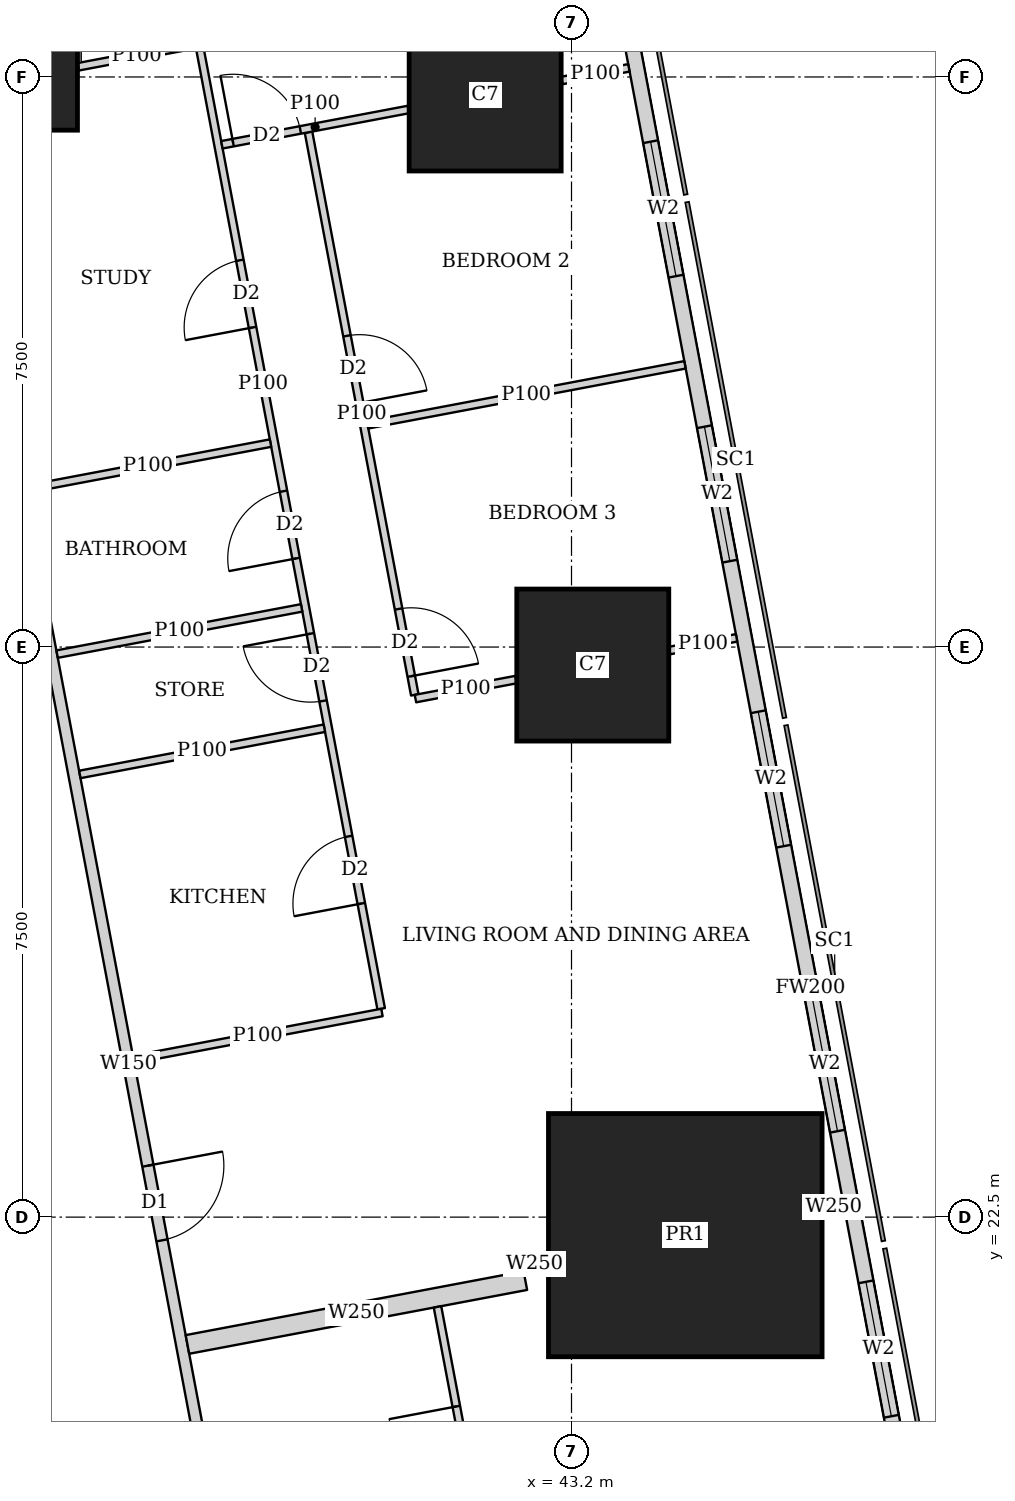
"""IFC4 building model, lengths in metres.
Left out: names, types, materials, properties, quantities, classifications, styles, units other than length and angle.
Written with IfcOpenShell. Run it as: python <this file> out.ifc"""

import sys

from ifc_helpers import new_model, si_unit, direction, frame, frame_2d, origin, origin_2d, place, context, subcontext, project, spatial, rectangle, extrude, element, fill, save


model = new_model("IFC4")
c1 = context("Model", 3, precision=1e-05, world=origin(), true_north=direction((0.0, 1.0)))
c2 = subcontext(c1, "Body", "Model", "MODEL_VIEW")
j1 = project(units=[si_unit("LENGTHUNIT", "METRE"), si_unit("PLANEANGLEUNIT", "RADIAN")], contexts=[c1])
p1 = place(None, origin())
s1 = spatial("IfcSite", under=j1, at=p1, CompositionType="ELEMENT")
p2 = place(p1, origin())
s2 = spatial("IfcBuilding", under=s1, at=p2, CompositionType="ELEMENT")
p3 = place(p2, frame((0.0, 0.0, 289.1)))
s3 = spatial("IfcBuildingStorey", under=s2, at=p3, CompositionType="ELEMENT", Elevation=289.1)
p4 = place(p3, frame((44.697, 22.263, 0.0), z_axis=(0.0, 0.0, 1.0), x_axis=(1.0, 0.0, 0.0)))
e1 = element("IfcColumn", 1, at=p4, inside=s3, PredefinedType="COLUMN", context=c2, shape_type="SweptSolid", body=[
    extrude(rectangle(XDim=3.6, YDim=3.2, at=origin_2d()), origin(), (0.0, 0.0, 1.0), 3.75),
])
p5 = place(p3, frame((43.48, 29.763, 0.0), z_axis=(0.0, 0.0, 1.0), x_axis=(1.0, 0.0, 0.0)))
e2 = element("IfcColumn", 2, at=p5, inside=s3, PredefinedType="COLUMN", context=c2, shape_type="SweptSolid", body=[
    extrude(rectangle(XDim=2.0, YDim=2.0, at=origin_2d()), origin(), (0.0, 0.0, 1.0), 3.75),
])
p6 = place(p3, frame((36.0, 37.5, 0.0), z_axis=(0.0, 0.0, 1.0), x_axis=(1.0, 0.0, 0.0)))
e3 = element("IfcColumn", 3, at=p6, inside=s3, PredefinedType="COLUMN", context=c2, shape_type="SweptSolid", body=[
    extrude(rectangle(XDim=1.4, YDim=1.4, at=origin_2d()), origin(), (0.0, 0.0, 1.0), 3.75),
])
p7 = place(p3, frame((42.064, 37.263, 0.0), z_axis=(0.0, 0.0, 1.0), x_axis=(1.0, 0.0, 0.0)))
e4 = element("IfcColumn", 4, at=p7, inside=s3, PredefinedType="COLUMN", context=c2, shape_type="SweptSolid", body=[
    extrude(rectangle(XDim=2.0, YDim=2.0, at=origin_2d()), origin(), (0.0, 0.0, 1.0), 3.75),
])
p8 = place(p3, frame((49.684, 7.832, 0.0), z_axis=(0.0, 0.0, 1.0), x_axis=(-0.185616669694, 0.982622232565, 0.0)))
e5 = element("IfcWall", 5, at=p8, inside=s3, PredefinedType="SOLIDWALL", context=c2, shape_type="SweptSolid", body=[
    extrude(rectangle(XDim=36.0, YDim=0.2, at=frame_2d((18.0, 0.0))), origin(), (0.0, 0.0, 1.0), 3.5),
])
p9 = place(p8, frame((2.518, 0.0, 0.9)))
e6 = element("IfcOpeningElement", 6, at=p9, cuts=e5, PredefinedType="OPENING", context=c2, shape_type="SweptSolid", body=[
    extrude(rectangle(XDim=2.4, YDim=1.5, at=frame_2d((1.2, 0.75))), frame((0.0, 0.11, 0.0), z_axis=(0.0, -1.0, 0.0), x_axis=(1.0, 0.0, 0.0)), (0.0, 0.0, 1.0), 0.22),
])
p10 = place(p8, frame((8.444, 0.0, 0.9)))
e7 = element("IfcOpeningElement", 7, at=p10, cuts=e5, PredefinedType="OPENING", context=c2, shape_type="SweptSolid", body=[
    extrude(rectangle(XDim=1.8, YDim=1.5, at=frame_2d((0.9, 0.75))), frame((0.0, 0.11, 0.0), z_axis=(0.0, -1.0, 0.0), x_axis=(1.0, 0.0, 0.0)), (0.0, 0.0, 1.0), 0.22),
])
p11 = place(p8, frame((12.261, 0.0, 0.9)))
e8 = element("IfcOpeningElement", 8, at=p11, cuts=e5, PredefinedType="OPENING", context=c2, shape_type="SweptSolid", body=[
    extrude(rectangle(XDim=1.8, YDim=1.5, at=frame_2d((0.9, 0.75))), frame((0.0, 0.11, 0.0), z_axis=(0.0, -1.0, 0.0), x_axis=(1.0, 0.0, 0.0)), (0.0, 0.0, 1.0), 0.22),
])
p12 = place(p8, frame((16.078, 0.0, 0.9)))
e9 = element("IfcOpeningElement", 9, at=p12, cuts=e5, PredefinedType="OPENING", context=c2, shape_type="SweptSolid", body=[
    extrude(rectangle(XDim=1.8, YDim=1.5, at=frame_2d((0.9, 0.75))), frame((0.0, 0.11, 0.0), z_axis=(0.0, -1.0, 0.0), x_axis=(1.0, 0.0, 0.0)), (0.0, 0.0, 1.0), 0.22),
])
p13 = place(p8, frame((19.894, 0.0, 0.9)))
e10 = element("IfcOpeningElement", 10, at=p13, cuts=e5, PredefinedType="OPENING", context=c2, shape_type="SweptSolid", body=[
    extrude(rectangle(XDim=1.8, YDim=1.5, at=frame_2d((0.9, 0.75))), frame((0.0, 0.11, 0.0), z_axis=(0.0, -1.0, 0.0), x_axis=(1.0, 0.0, 0.0)), (0.0, 0.0, 1.0), 0.22),
])
p14 = place(p8, frame((23.71, 0.0, 0.9)))
e11 = element("IfcOpeningElement", 11, at=p14, cuts=e5, PredefinedType="OPENING", context=c2, shape_type="SweptSolid", body=[
    extrude(rectangle(XDim=1.8, YDim=1.5, at=frame_2d((0.9, 0.75))), frame((0.0, 0.11, 0.0), z_axis=(0.0, -1.0, 0.0), x_axis=(1.0, 0.0, 0.0)), (0.0, 0.0, 1.0), 0.22),
])
p15 = place(p8, frame((27.526, 0.0, 0.9)))
e12 = element("IfcOpeningElement", 12, at=p15, cuts=e5, PredefinedType="OPENING", context=c2, shape_type="SweptSolid", body=[
    extrude(rectangle(XDim=1.8, YDim=1.5, at=frame_2d((0.9, 0.75))), frame((0.0, 0.11, 0.0), z_axis=(0.0, -1.0, 0.0), x_axis=(1.0, 0.0, 0.0)), (0.0, 0.0, 1.0), 0.22),
])
p16 = place(p8, frame((32.046, 0.0, 0.9)))
e13 = element("IfcOpeningElement", 13, at=p16, cuts=e5, PredefinedType="OPENING", context=c2, shape_type="SweptSolid", body=[
    extrude(rectangle(XDim=1.8, YDim=1.5, at=frame_2d((0.9, 0.75))), frame((0.0, 0.11, 0.0), z_axis=(0.0, -1.0, 0.0), x_axis=(1.0, 0.0, 0.0)), (0.0, 0.0, 1.0), 0.22),
])
p17 = place(p3, frame((34.036, 42.186, 0.0), z_axis=(0.0, 0.0, 1.0), x_axis=(0.185593518645, -0.9826266055, 0.0)))
e14 = element("IfcWall", 14, at=p17, inside=s3, PredefinedType="SOLIDWALL", context=c2, shape_type="SweptSolid", body=[
    extrude(rectangle(XDim=35.961, YDim=0.15, at=frame_2d((17.98, 0.0))), origin(), (0.0, 0.0, 1.0), 2.5),
])
p18 = place(p17, frame((19.345, 0.0, 0.0)))
e15 = element("IfcOpeningElement", 15, at=p18, cuts=e14, PredefinedType="OPENING", context=c2, shape_type="SweptSolid", body=[
    extrude(rectangle(XDim=1.0, YDim=2.1, at=frame_2d((0.5, 1.05))), frame((0.0, 0.085, 0.0), z_axis=(0.0, -1.0, 0.0), x_axis=(1.0, 0.0, 0.0)), (0.0, 0.0, 1.0), 0.17),
])
p19 = place(p17, frame((33.774, 0.0, 0.0)))
e16 = element("IfcOpeningElement", 16, at=p19, cuts=e14, PredefinedType="OPENING", context=c2, shape_type="SweptSolid", body=[
    extrude(rectangle(XDim=1.0, YDim=2.1, at=frame_2d((0.5, 1.05))), frame((0.0, 0.085, 0.0), z_axis=(0.0, -1.0, 0.0), x_axis=(1.0, 0.0, 0.0)), (0.0, 0.0, 1.0), 0.17),
])
p20 = place(p3, frame((43.955, 37.62, 0.0), z_axis=(0.0, 0.0, 1.0), x_axis=(-0.982708424405, -0.18515980288, 0.0)))
e17 = element("IfcWall", 17, at=p20, inside=s3, PredefinedType="PARTITIONING", context=c2, shape_type="SweptSolid", body=[
    extrude(rectangle(XDim=0.897, YDim=0.1, at=frame_2d((0.448, 0.0))), origin(), (0.0, 0.0, 1.0), 3.5),
])
p21 = place(p3, frame((41.054, 37.072, 0.0), z_axis=(0.0, 0.0, 1.0), x_axis=(-0.982579896219, -0.185840650951, 0.0)))
e18 = element("IfcWall", 18, at=p21, inside=s3, PredefinedType="PARTITIONING", context=c2, shape_type="SweptSolid", body=[
    extrude(rectangle(XDim=2.497, YDim=0.1, at=frame_2d((1.249, 0.0))), origin(), (0.0, 0.0, 1.0), 3.5),
])
p22 = place(p21, frame((1.447, 0.0, 0.0)))
e19 = element("IfcOpeningElement", 19, at=p22, cuts=e18, PredefinedType="OPENING", context=c2, shape_type="SweptSolid", body=[
    extrude(rectangle(XDim=0.9, YDim=2.1, at=frame_2d((0.45, 1.05))), frame((0.0, 0.06, 0.0), z_axis=(0.0, -1.0, 0.0), x_axis=(1.0, 0.0, 0.0)), (0.0, 0.0, 1.0), 0.12),
])
p23 = place(p3, frame((44.693, 33.713, 0.0), z_axis=(0.0, 0.0, 1.0), x_axis=(-0.982623519589, -0.185609856287, 0.0)))
e20 = element("IfcWall", 20, at=p23, inside=s3, PredefinedType="PARTITIONING", context=c2, shape_type="SweptSolid", body=[
    extrude(rectangle(XDim=4.25, YDim=0.1, at=frame_2d((2.125, 0.0))), origin(), (0.0, 0.0, 1.0), 2.5),
])
p24 = place(p3, frame((45.372, 30.121, 0.0), z_axis=(0.0, 0.0, 1.0), x_axis=(-0.982547416156, -0.186012297994, 0.0)))
e21 = element("IfcWall", 21, at=p24, inside=s3, PredefinedType="PARTITIONING", context=c2, shape_type="SweptSolid", body=[
    extrude(rectangle(XDim=0.898, YDim=0.1, at=frame_2d((0.449, 0.0))), origin(), (0.0, 0.0, 1.0), 3.5),
])
p25 = place(p3, frame((42.47, 29.572, 0.0), z_axis=(0.0, 0.0, 1.0), x_axis=(-0.982610503289, -0.185678751683, 0.0)))
e22 = element("IfcWall", 22, at=p25, inside=s3, PredefinedType="PARTITIONING", context=c2, shape_type="SweptSolid", body=[
    extrude(rectangle(XDim=1.346, YDim=0.1, at=frame_2d((0.673, 0.0))), origin(), (0.0, 0.0, 1.0), 2.5),
])
p26 = place(p3, frame((38.25, 37.925, 0.0), z_axis=(0.0, 0.0, 1.0), x_axis=(-0.982610209589, -0.185680305934, 0.0)))
e23 = element("IfcWall", 23, at=p26, inside=s3, PredefinedType="PARTITIONING", context=c2, shape_type="SweptSolid", body=[
    extrude(rectangle(XDim=1.567, YDim=0.1, at=frame_2d((0.784, 0.0))), origin(), (0.0, 0.0, 1.0), 3.5),
])
p27 = place(p3, frame((39.24, 32.683, 0.0), z_axis=(0.0, 0.0, 1.0), x_axis=(-0.982607026909, -0.185697147715, 0.0)))
e24 = element("IfcWall", 24, at=p27, inside=s3, PredefinedType="PARTITIONING", context=c2, shape_type="SweptSolid", body=[
    extrude(rectangle(XDim=3.275, YDim=0.1, at=frame_2d((1.637, 0.0))), origin(), (0.0, 0.0, 1.0), 3.5),
])
p28 = place(p3, frame((39.948, 28.932, 0.0), z_axis=(0.0, 0.0, 1.0), x_axis=(-0.982610347627, -0.185679575441, 0.0)))
e25 = element("IfcWall", 25, at=p28, inside=s3, PredefinedType="PARTITIONING", context=c2, shape_type="SweptSolid", body=[
    extrude(rectangle(XDim=3.274, YDim=0.1, at=frame_2d((1.637, 0.0))), origin(), (0.0, 0.0, 1.0), 3.5),
])
p29 = place(p3, frame((40.706, 25.192, 0.0), z_axis=(0.0, 0.0, 1.0), x_axis=(-0.982633623707, -0.185556356831, 0.0)))
e26 = element("IfcWall", 26, at=p29, inside=s3, PredefinedType="PARTITIONING", context=c2, shape_type="SweptSolid", body=[
    extrude(rectangle(XDim=3.325, YDim=0.1, at=frame_2d((1.663, 0.0))), origin(), (0.0, 0.0, 1.0), 3.5),
])
p30 = place(p3, frame((39.649, 30.515, 0.0), z_axis=(0.0, 0.0, 1.0), x_axis=(-0.982610347627, -0.185679575441, 0.0)))
e27 = element("IfcWall", 27, at=p30, inside=s3, PredefinedType="PARTITIONING", context=c2, shape_type="SweptSolid", body=[
    extrude(rectangle(XDim=3.274, YDim=0.1, at=frame_2d((1.637, 0.0))), origin(), (0.0, 0.0, 1.0), 2.5),
])
p31 = place(p3, frame((37.591, 41.685, 0.0), z_axis=(0.0, 0.0, 1.0), x_axis=(0.185541820726, -0.982636368532, 0.0)))
e28 = element("IfcWall", 28, at=p31, inside=s3, PredefinedType="PARTITIONING", context=c2, shape_type="SweptSolid", body=[
    extrude(rectangle(XDim=16.735, YDim=0.1, at=frame_2d((8.367, 0.0))), origin(), (0.0, 0.0, 1.0), 2.5),
])
p32 = place(p31, frame((2.413, 0.0, 0.0)))
e29 = element("IfcOpeningElement", 29, at=p32, cuts=e28, PredefinedType="OPENING", context=c2, shape_type="SweptSolid", body=[
    extrude(rectangle(XDim=0.9, YDim=2.1, at=frame_2d((0.45, 1.05))), frame((0.0, 0.06, 0.0), z_axis=(0.0, -1.0, 0.0), x_axis=(1.0, 0.0, 0.0)), (0.0, 0.0, 1.0), 0.12),
])
p33 = place(p31, frame((6.713, 0.0, 0.0)))
e30 = element("IfcOpeningElement", 30, at=p33, cuts=e28, PredefinedType="OPENING", context=c2, shape_type="SweptSolid", body=[
    extrude(rectangle(XDim=0.9, YDim=2.1, at=frame_2d((0.45, 1.05))), frame((0.0, 0.06, 0.0), z_axis=(0.0, -1.0, 0.0), x_axis=(1.0, 0.0, 0.0)), (0.0, 0.0, 1.0), 0.12),
])
p34 = place(p31, frame((9.805, 0.0, 0.0)))
e31 = element("IfcOpeningElement", 31, at=p34, cuts=e28, PredefinedType="OPENING", context=c2, shape_type="SweptSolid", body=[
    extrude(rectangle(XDim=0.9, YDim=2.1, at=frame_2d((0.45, 1.05))), frame((0.0, 0.06, 0.0), z_axis=(0.0, -1.0, 0.0), x_axis=(1.0, 0.0, 0.0)), (0.0, 0.0, 1.0), 0.12),
])
p35 = place(p31, frame((11.713, 0.0, 0.0)))
e32 = element("IfcOpeningElement", 32, at=p35, cuts=e28, PredefinedType="OPENING", context=c2, shape_type="SweptSolid", body=[
    extrude(rectangle(XDim=0.9, YDim=2.1, at=frame_2d((0.45, 1.05))), frame((0.0, 0.06, 0.0), z_axis=(0.0, -1.0, 0.0), x_axis=(1.0, 0.0, 0.0)), (0.0, 0.0, 1.0), 0.12),
])
p36 = place(p31, frame((14.426, 0.0, 0.0)))
e33 = element("IfcOpeningElement", 33, at=p36, cuts=e28, PredefinedType="OPENING", context=c2, shape_type="SweptSolid", body=[
    extrude(rectangle(XDim=0.9, YDim=2.1, at=frame_2d((0.45, 1.05))), frame((0.0, 0.06, 0.0), z_axis=(0.0, -1.0, 0.0), x_axis=(1.0, 0.0, 0.0)), (0.0, 0.0, 1.0), 0.12),
])
p37 = place(p3, frame((39.74, 36.773, 0.0), z_axis=(0.0, 0.0, 1.0), x_axis=(0.185583825641, -0.982628436216, 0.0)))
e34 = element("IfcWall", 34, at=p37, inside=s3, PredefinedType="PARTITIONING", context=c2, shape_type="SweptSolid", body=[
    extrude(rectangle(XDim=7.533, YDim=0.1, at=frame_2d((3.766, 0.0))), origin(), (0.0, 0.0, 1.0), 2.5),
])
p38 = place(p37, frame((2.726, 0.0, 0.0)))
e35 = element("IfcOpeningElement", 35, at=p38, cuts=e34, PredefinedType="OPENING", context=c2, shape_type="SweptSolid", body=[
    extrude(rectangle(XDim=0.9, YDim=2.1, at=frame_2d((0.45, 1.05))), frame((0.0, 0.06, 0.0), z_axis=(0.0, -1.0, 0.0), x_axis=(1.0, 0.0, 0.0)), (0.0, 0.0, 1.0), 0.12),
])
p39 = place(p37, frame((6.383, 0.0, 0.0)))
e36 = element("IfcOpeningElement", 36, at=p39, cuts=e34, PredefinedType="OPENING", context=c2, shape_type="SweptSolid", body=[
    extrude(rectangle(XDim=0.9, YDim=2.1, at=frame_2d((0.45, 1.05))), frame((0.0, 0.06, 0.0), z_axis=(0.0, -1.0, 0.0), x_axis=(1.0, 0.0, 0.0)), (0.0, 0.0, 1.0), 0.12),
])
p40 = place(p3, frame((46.782, 22.657, 0.0), z_axis=(0.0, 0.0, 1.0), x_axis=(-0.982104607121, -0.188336243648, 0.0)))
e37 = element("IfcWall", 37, at=p40, inside=s3, PredefinedType="SOLIDWALL", context=c2, shape_type="SweptSolid", body=[
    extrude(rectangle(XDim=0.266, YDim=0.25, at=frame_2d((0.133, 0.0))), origin(), (0.0, 0.0, 1.0), 3.5),
])
p41 = place(p3, frame((42.873, 21.918, 0.0), z_axis=(0.0, 0.0, 1.0), x_axis=(-0.982431406936, -0.186624035603, 0.0)))
e38 = element("IfcWall", 38, at=p41, inside=s3, PredefinedType="SOLIDWALL", context=c2, shape_type="SweptSolid", body=[
    extrude(rectangle(XDim=0.322, YDim=0.25, at=frame_2d((0.161, 0.0))), origin(), (0.0, 0.0, 1.0), 2.5),
])
p42 = place(p3, frame((42.593, 21.665, 0.0), z_axis=(0.0, 0.0, 1.0), x_axis=(-0.982612837616, -0.185666398014, 0.0)))
e39 = element("IfcWall", 39, at=p42, inside=s3, PredefinedType="SOLIDWALL", context=c2, shape_type="SweptSolid", body=[
    extrude(rectangle(XDim=4.525, YDim=0.25, at=frame_2d((2.262, 0.0))), origin(), (0.0, 0.0, 1.0), 2.5),
])
p43 = place(p3, frame((41.437, 21.319, 0.0), z_axis=(0.0, 0.0, 1.0), x_axis=(0.185742368638, -0.982598479794, 0.0)))
e40 = element("IfcWall", 40, at=p43, inside=s3, PredefinedType="PARTITIONING", context=c2, shape_type="SweptSolid", body=[
    extrude(rectangle(XDim=5.718, YDim=0.1, at=frame_2d((2.859, 0.0))), origin(), (0.0, 0.0, 1.0), 3.5),
])
p44 = place(p43, frame((1.333, 0.0, 0.0)))
e41 = element("IfcOpeningElement", 41, at=p44, cuts=e40, PredefinedType="OPENING", context=c2, shape_type="SweptSolid", body=[
    extrude(rectangle(XDim=0.9, YDim=2.1, at=frame_2d((0.45, 1.05))), frame((0.0, 0.06, 0.0), z_axis=(0.0, -1.0, 0.0), x_axis=(1.0, 0.0, 0.0)), (0.0, 0.0, 1.0), 0.12),
])
p45 = place(p43, frame((4.664, 0.0, 0.0)))
e42 = element("IfcOpeningElement", 42, at=p45, cuts=e40, PredefinedType="OPENING", context=c2, shape_type="SweptSolid", body=[
    extrude(rectangle(XDim=0.9, YDim=2.1, at=frame_2d((0.45, 1.05))), frame((0.0, 0.06, 0.0), z_axis=(0.0, -1.0, 0.0), x_axis=(1.0, 0.0, 0.0)), (0.0, 0.0, 1.0), 0.12),
])
p46 = place(p11, origin())
e43 = element("IfcWindow", 43, at=p46, inside=s3, PartitioningType="SINGLE_PANEL", PredefinedType="WINDOW", context=c2, shape_type="SweptSolid", body=[
    extrude(rectangle(XDim=1.8, YDim=1.5, at=frame_2d((0.9, 0.75))), frame((0.0, 0.03, 0.0), z_axis=(0.0, -1.0, 0.0), x_axis=(1.0, 0.0, 0.0)), (0.0, 0.0, 1.0), 0.06),
])
fill(e8, e43)
p47 = place(p12, origin())
e44 = element("IfcWindow", 44, at=p47, inside=s3, PartitioningType="SINGLE_PANEL", PredefinedType="WINDOW", context=c2, shape_type="SweptSolid", body=[
    extrude(rectangle(XDim=1.8, YDim=1.5, at=frame_2d((0.9, 0.75))), frame((0.0, 0.03, 0.0), z_axis=(0.0, -1.0, 0.0), x_axis=(1.0, 0.0, 0.0)), (0.0, 0.0, 1.0), 0.06),
])
fill(e9, e44)
p48 = place(p13, origin())
e45 = element("IfcWindow", 45, at=p48, inside=s3, PartitioningType="SINGLE_PANEL", PredefinedType="WINDOW", context=c2, shape_type="SweptSolid", body=[
    extrude(rectangle(XDim=1.8, YDim=1.5, at=frame_2d((0.9, 0.75))), frame((0.0, 0.03, 0.0), z_axis=(0.0, -1.0, 0.0), x_axis=(1.0, 0.0, 0.0)), (0.0, 0.0, 1.0), 0.06),
])
fill(e10, e45)
p49 = place(p14, origin())
e46 = element("IfcWindow", 46, at=p49, inside=s3, PartitioningType="SINGLE_PANEL", PredefinedType="WINDOW", context=c2, shape_type="SweptSolid", body=[
    extrude(rectangle(XDim=1.8, YDim=1.5, at=frame_2d((0.9, 0.75))), frame((0.0, 0.03, 0.0), z_axis=(0.0, -1.0, 0.0), x_axis=(1.0, 0.0, 0.0)), (0.0, 0.0, 1.0), 0.06),
])
fill(e11, e46)
p50 = place(p15, origin())
e47 = element("IfcWindow", 47, at=p50, inside=s3, PartitioningType="SINGLE_PANEL", PredefinedType="WINDOW", context=c2, shape_type="SweptSolid", body=[
    extrude(rectangle(XDim=1.8, YDim=1.5, at=frame_2d((0.9, 0.75))), frame((0.0, 0.03, 0.0), z_axis=(0.0, -1.0, 0.0), x_axis=(1.0, 0.0, 0.0)), (0.0, 0.0, 1.0), 0.06),
])
fill(e12, e47)
p51 = place(p22, origin())
e48 = element("IfcDoor", 48, at=p51, inside=s3, OperationType="SINGLE_SWING_LEFT", PredefinedType="DOOR", context=c2, shape_type="SweptSolid", body=[
    extrude(rectangle(XDim=0.9, YDim=2.1, at=frame_2d((0.45, 1.05))), frame((0.0, 0.025, 0.0), z_axis=(0.0, -1.0, 0.0), x_axis=(1.0, 0.0, 0.0)), (0.0, 0.0, 1.0), 0.05),
])
fill(e19, e48)
p52 = place(p33, origin())
e49 = element("IfcDoor", 49, at=p52, inside=s3, OperationType="SINGLE_SWING_LEFT", PredefinedType="DOOR", context=c2, shape_type="SweptSolid", body=[
    extrude(rectangle(XDim=0.9, YDim=2.1, at=frame_2d((0.45, 1.05))), frame((0.0, 0.025, 0.0), z_axis=(0.0, -1.0, 0.0), x_axis=(1.0, 0.0, 0.0)), (0.0, 0.0, 1.0), 0.05),
])
fill(e30, e49)
p53 = place(p34, origin())
e50 = element("IfcDoor", 50, at=p53, inside=s3, OperationType="SINGLE_SWING_LEFT", PredefinedType="DOOR", context=c2, shape_type="SweptSolid", body=[
    extrude(rectangle(XDim=0.9, YDim=2.1, at=frame_2d((0.45, 1.05))), frame((0.0, 0.025, 0.0), z_axis=(0.0, -1.0, 0.0), x_axis=(1.0, 0.0, 0.0)), (0.0, 0.0, 1.0), 0.05),
])
fill(e31, e50)
p54 = place(p35, origin())
e51 = element("IfcDoor", 51, at=p54, inside=s3, OperationType="SINGLE_SWING_RIGHT", PredefinedType="DOOR", context=c2, shape_type="SweptSolid", body=[
    extrude(rectangle(XDim=0.9, YDim=2.1, at=frame_2d((0.45, 1.05))), frame((0.0, 0.025, 0.0), z_axis=(0.0, -1.0, 0.0), x_axis=(1.0, 0.0, 0.0)), (0.0, 0.0, 1.0), 0.05),
])
fill(e32, e51)
p55 = place(p36, origin())
e52 = element("IfcDoor", 52, at=p55, inside=s3, OperationType="SINGLE_SWING_LEFT", PredefinedType="DOOR", context=c2, shape_type="SweptSolid", body=[
    extrude(rectangle(XDim=0.9, YDim=2.1, at=frame_2d((0.45, 1.05))), frame((0.0, 0.025, 0.0), z_axis=(0.0, -1.0, 0.0), x_axis=(1.0, 0.0, 0.0)), (0.0, 0.0, 1.0), 0.05),
])
fill(e33, e52)
p56 = place(p38, origin())
e53 = element("IfcDoor", 53, at=p56, inside=s3, OperationType="SINGLE_SWING_RIGHT", PredefinedType="DOOR", context=c2, shape_type="SweptSolid", body=[
    extrude(rectangle(XDim=0.9, YDim=2.1, at=frame_2d((0.45, 1.05))), frame((0.0, 0.025, 0.0), z_axis=(0.0, -1.0, 0.0), x_axis=(1.0, 0.0, 0.0)), (0.0, 0.0, 1.0), 0.05),
])
fill(e35, e53)
p57 = place(p39, origin())
e54 = element("IfcDoor", 54, at=p57, inside=s3, OperationType="SINGLE_SWING_RIGHT", PredefinedType="DOOR", context=c2, shape_type="SweptSolid", body=[
    extrude(rectangle(XDim=0.9, YDim=2.1, at=frame_2d((0.45, 1.05))), frame((0.0, 0.025, 0.0), z_axis=(0.0, -1.0, 0.0), x_axis=(1.0, 0.0, 0.0)), (0.0, 0.0, 1.0), 0.05),
])
fill(e36, e54)
p58 = place(p18, origin())
e55 = element("IfcDoor", 55, at=p58, inside=s3, OperationType="SINGLE_SWING_LEFT", PredefinedType="DOOR", context=c2, shape_type="SweptSolid", body=[
    extrude(rectangle(XDim=1.0, YDim=2.1, at=frame_2d((0.5, 1.05))), frame((0.0, 0.025, 0.0), z_axis=(0.0, -1.0, 0.0), x_axis=(1.0, 0.0, 0.0)), (0.0, 0.0, 1.0), 0.05),
])
fill(e15, e55)
p59 = place(p44, origin())
e56 = element("IfcDoor", 56, at=p59, inside=s3, OperationType="SINGLE_SWING_RIGHT", PredefinedType="DOOR", context=c2, shape_type="SweptSolid", body=[
    extrude(rectangle(XDim=0.9, YDim=2.1, at=frame_2d((0.45, 1.05))), frame((0.0, 0.025, 0.0), z_axis=(0.0, -1.0, 0.0), x_axis=(1.0, 0.0, 0.0)), (0.0, 0.0, 1.0), 0.05),
])
fill(e41, e56)
save(model, sys.argv[1])
